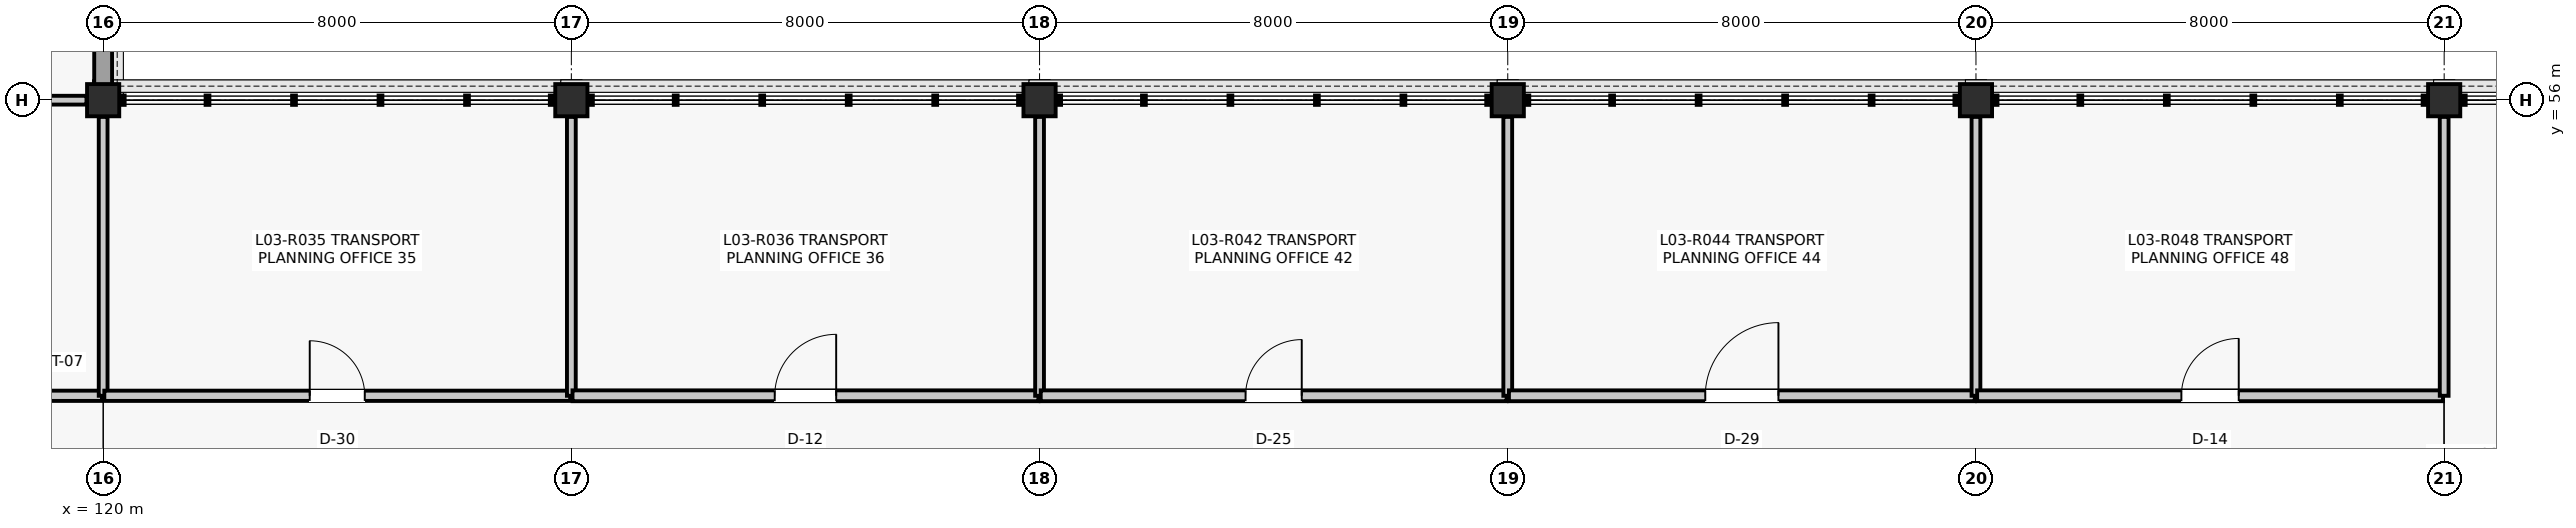
"""IFC4 building model, lengths in metres.
Left out: names, types, materials, properties, quantities, classifications, styles, units other than length and angle.
Written with IfcOpenShell. Run it as: python <this file> out.ifc"""

import sys

from ifc_helpers import new_model, si_unit, direction, frame, frame_2d, origin, origin_2d, place, context, subcontext, project, spatial, rectangle, extrude, element, fill, save


model = new_model("IFC4")
c1 = context("Model", 3, precision=1e-05, world=origin(), true_north=direction((0.0, 1.0)))
c2 = subcontext(c1, "Body", "Model", "MODEL_VIEW")
j1 = project(units=[si_unit("LENGTHUNIT", "METRE"), si_unit("PLANEANGLEUNIT", "RADIAN")], contexts=[c1])
p1 = place(None, origin())
s1 = spatial("IfcSite", under=j1, at=p1, CompositionType="ELEMENT")
p2 = place(p1, origin())
s2 = spatial("IfcBuilding", under=s1, at=p2, CompositionType="ELEMENT")
p3 = place(p2, frame((0.0, 0.0, 13.86)))
s3 = spatial("IfcBuildingStorey", under=s2, at=p3, CompositionType="ELEMENT", Elevation=13.86)
for number, where, z_axis, x_axis in (
    (1, (120.0, 56.0, 0.0), (0.0, 0.0, 1.0), (1.0, 0.0, 0.0)),
    (2, (128.0, 56.0, 0.0), (0.0, 0.0, 1.0), (1.0, 0.0, 0.0)),
    (3, (136.0, 56.0, 0.0), (0.0, 0.0, 1.0), (1.0, 0.0, 0.0)),
    (4, (144.0, 56.0, 0.0), (0.0, 0.0, 1.0), (1.0, 0.0, 0.0)),
    (5, (152.0, 56.0, 0.0), (0.0, 0.0, 1.0), (1.0, 0.0, 0.0)),
    (6, (160.0, 56.0, 0.0), (0.0, 0.0, 1.0), (1.0, 0.0, 0.0)),
):
    element("IfcColumn", number, at=place(p3, frame(where, z_axis=z_axis, x_axis=x_axis)), inside=s3, PredefinedType="COLUMN", context=c2, shape_type="SweptSolid", body=[
        extrude(rectangle(XDim=0.55, YDim=0.55, at=origin_2d()), origin(), (0.0, 0.0, 1.0), 3.96),
    ])
p4 = place(p3, frame((120.0, 56.26, 0.0), z_axis=(0.0, 0.0, 1.0), x_axis=(0.0, 1.0, 0.0)))
e7 = element("IfcWall", 7, at=p4, inside=s3, PredefinedType="SOLIDWALL", context=c2, shape_type="SweptSolid", body=[
    extrude(rectangle(XDim=7.48, YDim=0.305, at=frame_2d((3.74, 0.0))), origin(), (0.0, 0.0, 1.0), 3.364),
])
p5 = place(p4, frame((0.746, 0.0, 0.95)))
e8 = element("IfcOpeningElement", 8, at=p5, cuts=e7, PredefinedType="OPENING", context=c2, shape_type="SweptSolid", body=[
    extrude(rectangle(XDim=1.2, YDim=1.8, at=frame_2d((0.6, 0.9))), frame((0.0, 0.162, 0.0), z_axis=(0.0, -1.0, 0.0), x_axis=(1.0, 0.0, 0.0)), (0.0, 0.0, 1.0), 0.325),
])
p6 = place(p4, frame((5.534, 0.0, 0.95)))
e9 = element("IfcOpeningElement", 9, at=p6, cuts=e7, PredefinedType="OPENING", context=c2, shape_type="SweptSolid", body=[
    extrude(rectangle(XDim=1.2, YDim=1.8, at=frame_2d((0.6, 0.9))), frame((0.0, 0.162, 0.0), z_axis=(0.0, -1.0, 0.0), x_axis=(1.0, 0.0, 0.0)), (0.0, 0.0, 1.0), 0.325),
])
p7 = place(p3, frame((114.9, 50.95, 0.0), z_axis=(0.0, 0.0, 1.0), x_axis=(1.0, 0.0, 0.0)))
e10 = element("IfcWall", 10, at=p7, inside=s3, PredefinedType="PARTITIONING", context=c2, shape_type="SweptSolid", body=[
    extrude(rectangle(XDim=5.08, YDim=0.175, at=frame_2d((2.54, 0.0))), origin(), (0.0, 0.0, 1.0), 3.247),
])
p8 = place(p7, frame((1.98, 0.0, 0.0)))
e11 = element("IfcOpeningElement", 11, at=p8, cuts=e10, PredefinedType="OPENING", context=c2, shape_type="SweptSolid", body=[
    extrude(rectangle(XDim=1.12, YDim=2.22, at=frame_2d((0.56, 1.11))), frame((0.0, 0.097, 0.0), z_axis=(0.0, -1.0, 0.0), x_axis=(1.0, 0.0, 0.0)), (0.0, 0.0, 1.0), 0.195),
])
p9 = place(p3, frame((114.95, 56.0, 0.0), z_axis=(0.0, 0.0, 1.0), x_axis=(1.0, 0.0, 0.0)))
e12 = element("IfcWall", 12, at=p9, inside=s3, PredefinedType="PARTITIONING", context=c2, shape_type="SweptSolid", body=[
    extrude(rectangle(XDim=4.765, YDim=0.15, at=frame_2d((2.383, 0.0))), origin(), (0.0, 0.0, 1.0), 3.253),
])
p10 = place(p3, frame((120.0, 50.95, 0.0), z_axis=(0.0, 0.0, 1.0), x_axis=(0.0, 1.0, 0.0)))
e13 = element("IfcWall", 13, at=p10, inside=s3, PredefinedType="PARTITIONING", context=c2, shape_type="SweptSolid", body=[
    extrude(rectangle(XDim=4.765, YDim=0.15, at=frame_2d((2.383, 0.0))), origin(), (0.0, 0.0, 1.0), 3.247),
])
p11 = place(p3, frame((120.02, 50.95, 0.0), z_axis=(0.0, 0.0, 1.0), x_axis=(1.0, 0.0, 0.0)))
e14 = element("IfcWall", 14, at=p11, inside=s3, PredefinedType="PARTITIONING", context=c2, shape_type="SweptSolid", body=[
    extrude(rectangle(XDim=7.96, YDim=0.175, at=frame_2d((3.98, 0.0))), origin(), (0.0, 0.0, 1.0), 3.247),
])
p12 = place(p11, frame((3.51, 0.0, 0.0)))
e15 = element("IfcOpeningElement", 15, at=p12, cuts=e14, PredefinedType="OPENING", context=c2, shape_type="SweptSolid", body=[
    extrude(rectangle(XDim=0.94, YDim=2.12, at=frame_2d((0.47, 1.06))), frame((0.0, 0.097, 0.0), z_axis=(0.0, -1.0, 0.0), x_axis=(1.0, 0.0, 0.0)), (0.0, 0.0, 1.0), 0.195),
])
p13 = place(p3, frame((128.0, 50.95, 0.0), z_axis=(0.0, 0.0, 1.0), x_axis=(0.0, 1.0, 0.0)))
e16 = element("IfcWall", 16, at=p13, inside=s3, PredefinedType="PARTITIONING", context=c2, shape_type="SweptSolid", body=[
    extrude(rectangle(XDim=4.765, YDim=0.15, at=frame_2d((2.383, 0.0))), origin(), (0.0, 0.0, 1.0), 3.253),
])
p14 = place(p3, frame((128.02, 50.95, 0.0), z_axis=(0.0, 0.0, 1.0), x_axis=(1.0, 0.0, 0.0)))
e17 = element("IfcWall", 17, at=p14, inside=s3, PredefinedType="PARTITIONING", context=c2, shape_type="SweptSolid", body=[
    extrude(rectangle(XDim=7.96, YDim=0.185, at=frame_2d((3.98, 0.0))), origin(), (0.0, 0.0, 1.0), 3.253),
])
p15 = place(p14, frame((3.455, 0.0, 0.0)))
e18 = element("IfcOpeningElement", 18, at=p15, cuts=e17, PredefinedType="OPENING", context=c2, shape_type="SweptSolid", body=[
    extrude(rectangle(XDim=1.05, YDim=2.15, at=frame_2d((0.525, 1.075))), frame((0.0, 0.103, 0.0), z_axis=(0.0, -1.0, 0.0), x_axis=(1.0, 0.0, 0.0)), (0.0, 0.0, 1.0), 0.205),
])
p16 = place(p3, frame((136.0, 50.95, 0.0), z_axis=(0.0, 0.0, 1.0), x_axis=(0.0, 1.0, 0.0)))
e19 = element("IfcWall", 19, at=p16, inside=s3, PredefinedType="PARTITIONING", context=c2, shape_type="SweptSolid", body=[
    extrude(rectangle(XDim=4.765, YDim=0.15, at=frame_2d((2.383, 0.0))), origin(), (0.0, 0.0, 1.0), 3.452),
])
p17 = place(p3, frame((136.02, 50.95, 0.0), z_axis=(0.0, 0.0, 1.0), x_axis=(1.0, 0.0, 0.0)))
e20 = element("IfcWall", 20, at=p17, inside=s3, PredefinedType="PARTITIONING", context=c2, shape_type="SweptSolid", body=[
    extrude(rectangle(XDim=7.96, YDim=0.185, at=frame_2d((3.98, 0.0))), origin(), (0.0, 0.0, 1.0), 3.247),
])
p18 = place(p17, frame((3.5, 0.0, 0.0)))
e21 = element("IfcOpeningElement", 21, at=p18, cuts=e20, PredefinedType="OPENING", context=c2, shape_type="SweptSolid", body=[
    extrude(rectangle(XDim=0.96, YDim=2.14, at=frame_2d((0.48, 1.07))), frame((0.0, 0.103, 0.0), z_axis=(0.0, -1.0, 0.0), x_axis=(1.0, 0.0, 0.0)), (0.0, 0.0, 1.0), 0.205),
])
p19 = place(p3, frame((144.0, 50.95, 0.0), z_axis=(0.0, 0.0, 1.0), x_axis=(0.0, 1.0, 0.0)))
e22 = element("IfcWall", 22, at=p19, inside=s3, PredefinedType="PARTITIONING", context=c2, shape_type="SweptSolid", body=[
    extrude(rectangle(XDim=4.765, YDim=0.15, at=frame_2d((2.383, 0.0))), origin(), (0.0, 0.0, 1.0), 3.247),
])
p20 = place(p3, frame((144.02, 50.95, 0.0), z_axis=(0.0, 0.0, 1.0), x_axis=(1.0, 0.0, 0.0)))
e23 = element("IfcWall", 23, at=p20, inside=s3, PredefinedType="PARTITIONING", context=c2, shape_type="SweptSolid", body=[
    extrude(rectangle(XDim=7.96, YDim=0.185, at=frame_2d((3.98, 0.0))), origin(), (0.0, 0.0, 1.0), 3.247),
])
p21 = place(p20, frame((3.355, 0.0, 0.0)))
e24 = element("IfcOpeningElement", 24, at=p21, cuts=e23, PredefinedType="OPENING", context=c2, shape_type="SweptSolid", body=[
    extrude(rectangle(XDim=1.25, YDim=2.18, at=frame_2d((0.625, 1.09))), frame((0.0, 0.103, 0.0), z_axis=(0.0, -1.0, 0.0), x_axis=(1.0, 0.0, 0.0)), (0.0, 0.0, 1.0), 0.205),
])
p22 = place(p3, frame((152.0, 50.95, 0.0), z_axis=(0.0, 0.0, 1.0), x_axis=(0.0, 1.0, 0.0)))
e25 = element("IfcWall", 25, at=p22, inside=s3, PredefinedType="PARTITIONING", context=c2, shape_type="SweptSolid", body=[
    extrude(rectangle(XDim=4.765, YDim=0.15, at=frame_2d((2.383, 0.0))), origin(), (0.0, 0.0, 1.0), 3.253),
])
p23 = place(p3, frame((152.02, 50.95, 0.0), z_axis=(0.0, 0.0, 1.0), x_axis=(1.0, 0.0, 0.0)))
e26 = element("IfcWall", 26, at=p23, inside=s3, PredefinedType="PARTITIONING", context=c2, shape_type="SweptSolid", body=[
    extrude(rectangle(XDim=7.96, YDim=0.185, at=frame_2d((3.98, 0.0))), origin(), (0.0, 0.0, 1.0), 3.253),
])
p24 = place(p23, frame((3.49, 0.0, 0.0)))
e27 = element("IfcOpeningElement", 27, at=p24, cuts=e26, PredefinedType="OPENING", context=c2, shape_type="SweptSolid", body=[
    extrude(rectangle(XDim=0.98, YDim=2.15, at=frame_2d((0.49, 1.075))), frame((0.0, 0.103, 0.0), z_axis=(0.0, -1.0, 0.0), x_axis=(1.0, 0.0, 0.0)), (0.0, 0.0, 1.0), 0.205),
])
p25 = place(p3, frame((160.0, 50.95, 0.0), z_axis=(0.0, 0.0, 1.0), x_axis=(0.0, 1.0, 0.0)))
e28 = element("IfcWall", 28, at=p25, inside=s3, PredefinedType="PARTITIONING", context=c2, shape_type="SweptSolid", body=[
    extrude(rectangle(XDim=4.765, YDim=0.15, at=frame_2d((2.383, 0.0))), origin(), (0.0, 0.0, 1.0), 3.452),
])
p26 = place(p12, origin())
e29 = element("IfcDoor", 29, at=p26, inside=s3, OperationType="SINGLE_SWING_LEFT", PredefinedType="DOOR", context=c2, shape_type="SweptSolid", body=[
    extrude(rectangle(XDim=0.94, YDim=2.12, at=frame_2d((0.47, 1.06))), frame((0.0, 0.025, 0.0), z_axis=(0.0, -1.0, 0.0), x_axis=(1.0, 0.0, 0.0)), (0.0, 0.0, 1.0), 0.05),
])
fill(e15, e29)
p27 = place(p15, origin())
e30 = element("IfcDoor", 30, at=p27, inside=s3, OperationType="SINGLE_SWING_RIGHT", PredefinedType="DOOR", context=c2, shape_type="SweptSolid", body=[
    extrude(rectangle(XDim=1.05, YDim=2.15, at=frame_2d((0.525, 1.075))), frame((0.0, 0.025, 0.0), z_axis=(0.0, -1.0, 0.0), x_axis=(1.0, 0.0, 0.0)), (0.0, 0.0, 1.0), 0.05),
])
fill(e18, e30)
p28 = place(p18, origin())
e31 = element("IfcDoor", 31, at=p28, inside=s3, OperationType="SINGLE_SWING_RIGHT", PredefinedType="DOOR", context=c2, shape_type="SweptSolid", body=[
    extrude(rectangle(XDim=0.96, YDim=2.14, at=frame_2d((0.48, 1.07))), frame((0.0, 0.025, 0.0), z_axis=(0.0, -1.0, 0.0), x_axis=(1.0, 0.0, 0.0)), (0.0, 0.0, 1.0), 0.05),
])
fill(e21, e31)
p29 = place(p21, origin())
e32 = element("IfcDoor", 32, at=p29, inside=s3, OperationType="SINGLE_SWING_RIGHT", PredefinedType="DOOR", context=c2, shape_type="SweptSolid", body=[
    extrude(rectangle(XDim=1.25, YDim=2.18, at=frame_2d((0.625, 1.09))), frame((0.0, 0.025, 0.0), z_axis=(0.0, -1.0, 0.0), x_axis=(1.0, 0.0, 0.0)), (0.0, 0.0, 1.0), 0.05),
])
fill(e24, e32)
p30 = place(p24, origin())
e33 = element("IfcDoor", 33, at=p30, inside=s3, OperationType="SINGLE_SWING_RIGHT", PredefinedType="DOOR", context=c2, shape_type="SweptSolid", body=[
    extrude(rectangle(XDim=0.98, YDim=2.15, at=frame_2d((0.49, 1.075))), frame((0.0, 0.025, 0.0), z_axis=(0.0, -1.0, 0.0), x_axis=(1.0, 0.0, 0.0)), (0.0, 0.0, 1.0), 0.05),
])
fill(e27, e33)
save(model, sys.argv[1])
